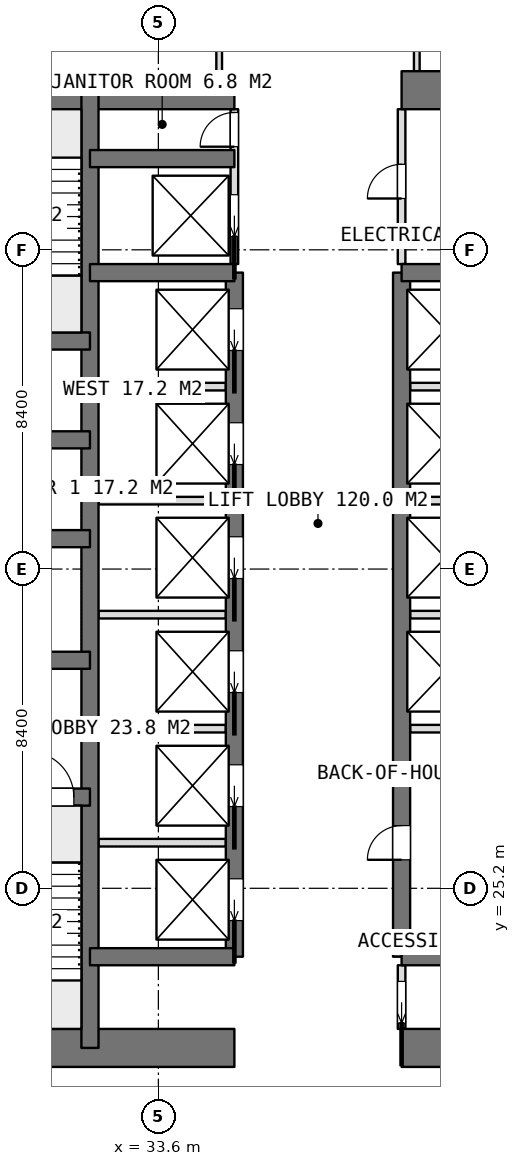
"""IFC4 building model, lengths in metres.
Left out: names, types, materials, properties, quantities, classifications, styles, units other than length and angle.
Written with IfcOpenShell. Run it as: python <this file> out.ifc"""

import sys

from ifc_helpers import new_model, si_unit, direction, frame, frame_2d, origin, place, context, subcontext, project, spatial, rectangle, extrude, element, fill, save


model = new_model("IFC4")
c1 = context("Model", 3, precision=1e-05, world=origin(), true_north=direction((0.0, 1.0)))
c2 = subcontext(c1, "Body", "Model", "MODEL_VIEW")
j1 = project(units=[si_unit("LENGTHUNIT", "METRE"), si_unit("PLANEANGLEUNIT", "RADIAN")], contexts=[c1])
p1 = place(None, origin())
s1 = spatial("IfcSite", under=j1, at=p1, CompositionType="ELEMENT")
p2 = place(p1, origin())
s2 = spatial("IfcBuilding", under=s1, at=p2, CompositionType="ELEMENT")
p3 = place(p2, frame((0.0, 0.0, 102.8)))
s3 = spatial("IfcBuildingStorey", under=s2, at=p3, CompositionType="ELEMENT", Elevation=102.8)
p4 = place(p3, frame((25.2, 21.0, 0.0), z_axis=(0.0, 0.0, 1.0), x_axis=(1.0, 0.0, 0.0)))
e1 = element("IfcWall", 1, at=p4, inside=s3, PredefinedType="SHEAR", context=c2, shape_type="SweptSolid", body=[
    extrude(rectangle(XDim=10.4, YDim=1.0, at=frame_2d((5.2, 0.0))), origin(), (0.0, 0.0, 1.0), 3.75),
])
p5 = place(p3, frame((40.0, 21.0, 0.0), z_axis=(0.0, 0.0, 1.0), x_axis=(1.0, 0.0, 0.0)))
e2 = element("IfcWall", 2, at=p5, inside=s3, PredefinedType="SHEAR", context=c2, shape_type="SweptSolid", body=[
    extrude(rectangle(XDim=10.4, YDim=1.0, at=frame_2d((5.2, 0.0))), origin(), (0.0, 0.0, 1.0), 3.75),
])
p6 = place(p3, frame((25.2, 46.2, 0.0), z_axis=(0.0, 0.0, 1.0), x_axis=(1.0, 0.0, 0.0)))
e3 = element("IfcWall", 3, at=p6, inside=s3, PredefinedType="SHEAR", context=c2, shape_type="SweptSolid", body=[
    extrude(rectangle(XDim=10.4, YDim=1.0, at=frame_2d((5.2, 0.0))), origin(), (0.0, 0.0, 1.0), 3.75),
])
p7 = place(p3, frame((40.0, 46.2, 0.0), z_axis=(0.0, 0.0, 1.0), x_axis=(1.0, 0.0, 0.0)))
e4 = element("IfcWall", 4, at=p7, inside=s3, PredefinedType="SHEAR", context=c2, shape_type="SweptSolid", body=[
    extrude(rectangle(XDim=10.4, YDim=1.0, at=frame_2d((5.2, 0.0))), origin(), (0.0, 0.0, 1.0), 3.75),
])
p8 = place(p3, frame((31.8, 21.0, 0.0), z_axis=(0.0, 0.0, 1.0), x_axis=(0.0, 1.0, 0.0)))
e5 = element("IfcWall", 5, at=p8, inside=s3, PredefinedType="SHEAR", context=c2, shape_type="SweptSolid", body=[
    extrude(rectangle(XDim=25.2, YDim=0.45, at=frame_2d((12.6, 0.0))), origin(), (0.0, 0.0, 1.0), 3.75),
])
p9 = place(p3, frame((35.6, 23.4, 0.0), z_axis=(0.0, 0.0, 1.0), x_axis=(0.0, 1.0, 0.0)))
e6 = element("IfcWall", 6, at=p9, inside=s3, PredefinedType="SHEAR", context=c2, shape_type="SweptSolid", body=[
    extrude(rectangle(XDim=18.0, YDim=0.45, at=frame_2d((9.0, 0.0))), origin(), (0.0, 0.0, 1.0), 3.75),
])
p10 = place(p9, frame((0.95, 0.0, 0.0)))
e7 = element("IfcOpeningElement", 7, at=p10, cuts=e6, PredefinedType="OPENING", context=c2, shape_type="SweptSolid", body=[
    extrude(rectangle(XDim=1.1, YDim=2.1, at=frame_2d((0.55, 1.05))), frame((0.0, 0.235, 0.0), z_axis=(0.0, -1.0, 0.0), x_axis=(1.0, 0.0, 0.0)), (0.0, 0.0, 1.0), 0.47),
])
p11 = place(p9, frame((3.95, 0.0, 0.0)))
e8 = element("IfcOpeningElement", 8, at=p11, cuts=e6, PredefinedType="OPENING", context=c2, shape_type="SweptSolid", body=[
    extrude(rectangle(XDim=1.1, YDim=2.1, at=frame_2d((0.55, 1.05))), frame((0.0, 0.235, 0.0), z_axis=(0.0, -1.0, 0.0), x_axis=(1.0, 0.0, 0.0)), (0.0, 0.0, 1.0), 0.47),
])
p12 = place(p9, frame((6.95, 0.0, 0.0)))
e9 = element("IfcOpeningElement", 9, at=p12, cuts=e6, PredefinedType="OPENING", context=c2, shape_type="SweptSolid", body=[
    extrude(rectangle(XDim=1.1, YDim=2.1, at=frame_2d((0.55, 1.05))), frame((0.0, 0.235, 0.0), z_axis=(0.0, -1.0, 0.0), x_axis=(1.0, 0.0, 0.0)), (0.0, 0.0, 1.0), 0.47),
])
p13 = place(p9, frame((9.95, 0.0, 0.0)))
e10 = element("IfcOpeningElement", 10, at=p13, cuts=e6, PredefinedType="OPENING", context=c2, shape_type="SweptSolid", body=[
    extrude(rectangle(XDim=1.1, YDim=2.1, at=frame_2d((0.55, 1.05))), frame((0.0, 0.235, 0.0), z_axis=(0.0, -1.0, 0.0), x_axis=(1.0, 0.0, 0.0)), (0.0, 0.0, 1.0), 0.47),
])
p14 = place(p9, frame((12.95, 0.0, 0.0)))
e11 = element("IfcOpeningElement", 11, at=p14, cuts=e6, PredefinedType="OPENING", context=c2, shape_type="SweptSolid", body=[
    extrude(rectangle(XDim=1.1, YDim=2.1, at=frame_2d((0.55, 1.05))), frame((0.0, 0.235, 0.0), z_axis=(0.0, -1.0, 0.0), x_axis=(1.0, 0.0, 0.0)), (0.0, 0.0, 1.0), 0.47),
])
p15 = place(p9, frame((15.95, 0.0, 0.0)))
e12 = element("IfcOpeningElement", 12, at=p15, cuts=e6, PredefinedType="OPENING", context=c2, shape_type="SweptSolid", body=[
    extrude(rectangle(XDim=1.1, YDim=2.1, at=frame_2d((0.55, 1.05))), frame((0.0, 0.235, 0.0), z_axis=(0.0, -1.0, 0.0), x_axis=(1.0, 0.0, 0.0)), (0.0, 0.0, 1.0), 0.47),
])
p16 = place(p3, frame((40.0, 23.4, 0.0), z_axis=(0.0, 0.0, 1.0), x_axis=(0.0, 1.0, 0.0)))
e13 = element("IfcWall", 13, at=p16, inside=s3, PredefinedType="SHEAR", context=c2, shape_type="SweptSolid", body=[
    extrude(rectangle(XDim=18.0, YDim=0.45, at=frame_2d((9.0, 0.0))), origin(), (0.0, 0.0, 1.0), 3.75),
])
p17 = place(p16, frame((2.55, 0.0, 0.0)))
e14 = element("IfcOpeningElement", 14, at=p17, cuts=e13, PredefinedType="OPENING", context=c2, shape_type="SweptSolid", body=[
    extrude(rectangle(XDim=0.9, YDim=2.1, at=frame_2d((0.45, 1.05))), frame((0.0, 0.235, 0.0), z_axis=(0.0, -1.0, 0.0), x_axis=(1.0, 0.0, 0.0)), (0.0, 0.0, 1.0), 0.47),
])
for number, where, z_axis, x_axis in (
    (15, (31.8, 23.4, 0.0), (0.0, 0.0, 1.0), (1.0, 0.0, 0.0)),
    (16, (31.8, 41.4, 0.0), (0.0, 0.0, 1.0), (1.0, 0.0, 0.0)),
    (17, (31.8, 44.4, 0.0), (0.0, 0.0, 1.0), (1.0, 0.0, 0.0)),
    (18, (40.0, 23.4, 0.0), (0.0, 0.0, 1.0), (1.0, 0.0, 0.0)),
    (19, (40.0, 41.4, 0.0), (0.0, 0.0, 1.0), (1.0, 0.0, 0.0)),
):
    element("IfcWall", number, at=place(p3, frame(where, z_axis=z_axis, x_axis=x_axis)), inside=s3, PredefinedType="SHEAR", context=c2, shape_type="SweptSolid", body=[
        extrude(rectangle(XDim=3.8, YDim=0.45, at=frame_2d((1.9, 0.0))), origin(), (0.0, 0.0, 1.0), 3.75),
    ])
p18 = place(p3, frame((25.2, 27.6, 0.0), z_axis=(0.0, 0.0, 1.0), x_axis=(1.0, 0.0, 0.0)))
e20 = element("IfcWall", 20, at=p18, inside=s3, PredefinedType="SHEAR", context=c2, shape_type="SweptSolid", body=[
    extrude(rectangle(XDim=6.6, YDim=0.45, at=frame_2d((3.3, 0.0))), origin(), (0.0, 0.0, 1.0), 3.75),
])
p19 = place(p18, frame((4.975, 0.0, 0.0)))
e21 = element("IfcOpeningElement", 21, at=p19, cuts=e20, PredefinedType="OPENING", context=c2, shape_type="SweptSolid", body=[
    extrude(rectangle(XDim=1.2, YDim=2.1, at=frame_2d((0.6, 1.05))), frame((0.0, 0.235, 0.0), z_axis=(0.0, -1.0, 0.0), x_axis=(1.0, 0.0, 0.0)), (0.0, 0.0, 1.0), 0.47),
])
p20 = place(p3, frame((25.2, 31.2, 0.0), z_axis=(0.0, 0.0, 1.0), x_axis=(1.0, 0.0, 0.0)))
e22 = element("IfcWall", 22, at=p20, inside=s3, PredefinedType="SHEAR", context=c2, shape_type="SweptSolid", body=[
    extrude(rectangle(XDim=6.6, YDim=0.45, at=frame_2d((3.3, 0.0))), origin(), (0.0, 0.0, 1.0), 3.75),
])
p21 = place(p20, frame((2.65, 0.0, 0.0)))
e23 = element("IfcOpeningElement", 23, at=p21, cuts=e22, PredefinedType="OPENING", context=c2, shape_type="SweptSolid", body=[
    extrude(rectangle(XDim=1.3, YDim=2.1, at=frame_2d((0.65, 1.05))), frame((0.0, 0.235, 0.0), z_axis=(0.0, -1.0, 0.0), x_axis=(1.0, 0.0, 0.0)), (0.0, 0.0, 1.0), 0.47),
])
for number, where, z_axis, x_axis in (
    (24, (25.2, 34.4, 0.0), (0.0, 0.0, 1.0), (1.0, 0.0, 0.0)),
    (25, (25.2, 37.0, 0.0), (0.0, 0.0, 1.0), (1.0, 0.0, 0.0)),
    (26, (25.2, 39.6, 0.0), (0.0, 0.0, 1.0), (1.0, 0.0, 0.0)),
):
    element("IfcWall", number, at=place(p3, frame(where, z_axis=z_axis, x_axis=x_axis)), inside=s3, PredefinedType="SHEAR", context=c2, shape_type="SweptSolid", body=[
        extrude(rectangle(XDim=6.6, YDim=0.45, at=frame_2d((3.3, 0.0))), origin(), (0.0, 0.0, 1.0), 3.75),
    ])
for number, where, z_axis, x_axis in (
    (27, (32.025, 26.4, 0.0), (0.0, 0.0, 1.0), (1.0, 0.0, 0.0)),
    (28, (32.025, 29.4, 0.0), (0.0, 0.0, 1.0), (1.0, 0.0, 0.0)),
    (29, (32.025, 32.4, 0.0), (0.0, 0.0, 1.0), (1.0, 0.0, 0.0)),
    (30, (32.025, 35.4, 0.0), (0.0, 0.0, 1.0), (1.0, 0.0, 0.0)),
    (31, (32.025, 38.4, 0.0), (0.0, 0.0, 1.0), (1.0, 0.0, 0.0)),
):
    element("IfcWall", number, at=place(p3, frame(where, z_axis=z_axis, x_axis=x_axis)), inside=s3, PredefinedType="PARTITIONING", context=c2, shape_type="SweptSolid", body=[
        extrude(rectangle(XDim=3.35, YDim=0.2, at=frame_2d((1.675, 0.0))), origin(), (0.0, 0.0, 1.0), 3.5),
    ])
for number, where, z_axis, x_axis in (
    (32, (40.225, 29.4, 0.0), (0.0, 0.0, 1.0), (1.0, 0.0, 0.0)),
    (33, (40.225, 32.4, 0.0), (0.0, 0.0, 1.0), (1.0, 0.0, 0.0)),
    (34, (40.225, 35.4, 0.0), (0.0, 0.0, 1.0), (1.0, 0.0, 0.0)),
    (35, (40.225, 38.4, 0.0), (0.0, 0.0, 1.0), (1.0, 0.0, 0.0)),
):
    element("IfcWall", number, at=place(p3, frame(where, z_axis=z_axis, x_axis=x_axis)), inside=s3, PredefinedType="PARTITIONING", context=c2, shape_type="SweptSolid", body=[
        extrude(rectangle(XDim=3.35, YDim=0.2, at=frame_2d((1.675, 0.0))), origin(), (0.0, 0.0, 1.0), 3.5),
    ])
p22 = place(p3, frame((40.0, 21.5, 0.0), z_axis=(0.0, 0.0, 1.0), x_axis=(0.0, 1.0, 0.0)))
e36 = element("IfcWall", 36, at=p22, inside=s3, PredefinedType="PARTITIONING", context=c2, shape_type="SweptSolid", body=[
    extrude(rectangle(XDim=1.675, YDim=0.2, at=frame_2d((0.837, 0.0))), origin(), (0.0, 0.0, 1.0), 3.5),
])
p23 = place(p22, frame((0.15, 0.0, 0.0)))
e37 = element("IfcOpeningElement", 37, at=p23, cuts=e36, PredefinedType="OPENING", context=c2, shape_type="SweptSolid", body=[
    extrude(rectangle(XDim=1.1, YDim=2.1, at=frame_2d((0.55, 1.05))), frame((0.0, 0.11, 0.0), z_axis=(0.0, -1.0, 0.0), x_axis=(1.0, 0.0, 0.0)), (0.0, 0.0, 1.0), 0.22),
])
p24 = place(p3, frame((40.0, 41.625, 0.0), z_axis=(0.0, 0.0, 1.0), x_axis=(0.0, 1.0, 0.0)))
e38 = element("IfcWall", 38, at=p24, inside=s3, PredefinedType="PARTITIONING", context=c2, shape_type="SweptSolid", body=[
    extrude(rectangle(XDim=4.075, YDim=0.2, at=frame_2d((2.038, 0.0))), origin(), (0.0, 0.0, 1.0), 3.5),
])
p25 = place(p24, frame((1.725, 0.0, 0.0)))
e39 = element("IfcOpeningElement", 39, at=p25, cuts=e38, PredefinedType="OPENING", context=c2, shape_type="SweptSolid", body=[
    extrude(rectangle(XDim=0.9, YDim=2.1, at=frame_2d((0.45, 1.05))), frame((0.0, 0.11, 0.0), z_axis=(0.0, -1.0, 0.0), x_axis=(1.0, 0.0, 0.0)), (0.0, 0.0, 1.0), 0.22),
])
p26 = place(p3, frame((35.6, 41.625, 0.0), z_axis=(0.0, 0.0, 1.0), x_axis=(0.0, 1.0, 0.0)))
e40 = element("IfcWall", 40, at=p26, inside=s3, PredefinedType="PARTITIONING", context=c2, shape_type="SweptSolid", body=[
    extrude(rectangle(XDim=4.075, YDim=0.2, at=frame_2d((2.038, 0.0))), origin(), (0.0, 0.0, 1.0), 3.5),
])
p27 = place(p26, frame((3.088, 0.0, 0.0)))
e41 = element("IfcOpeningElement", 41, at=p27, cuts=e40, PredefinedType="OPENING", context=c2, shape_type="SweptSolid", body=[
    extrude(rectangle(XDim=0.9, YDim=2.1, at=frame_2d((0.45, 1.05))), frame((0.0, 0.11, 0.0), z_axis=(0.0, -1.0, 0.0), x_axis=(1.0, 0.0, 0.0)), (0.0, 0.0, 1.0), 0.22),
])
p28 = place(p26, frame((0.725, 0.0, 0.0)))
e42 = element("IfcOpeningElement", 42, at=p28, cuts=e40, PredefinedType="OPENING", context=c2, shape_type="SweptSolid", body=[
    extrude(rectangle(XDim=1.1, YDim=2.1, at=frame_2d((0.55, 1.05))), frame((0.0, 0.11, 0.0), z_axis=(0.0, -1.0, 0.0), x_axis=(1.0, 0.0, 0.0)), (0.0, 0.0, 1.0), 0.22),
])
for number, where, z_axis, x_axis in (
    (43, (40.4, 46.7, 0.0), (0.0, 0.0, 1.0), (0.0, 1.0, 0.0)),
    (44, (35.2, 46.7, 0.0), (0.0, 0.0, 1.0), (0.0, 1.0, 0.0)),
):
    element("IfcWall", number, at=place(p3, frame(where, z_axis=z_axis, x_axis=x_axis)), inside=s3, PredefinedType="PARTITIONING", context=c2, shape_type="SweptSolid", body=[
        extrude(rectangle(XDim=2.625, YDim=0.15, at=frame_2d((1.312, 0.0))), origin(), (0.0, 0.0, 1.0), 3.5),
    ])
p29 = place(p23, origin())
e45 = element("IfcDoor", 45, at=p29, inside=s3, OperationType="SLIDING_TO_LEFT", PredefinedType="DOOR", context=c2, shape_type="SweptSolid", body=[
    extrude(rectangle(XDim=1.1, YDim=2.1, at=frame_2d((0.55, 1.05))), frame((0.0, 0.025, 0.0), z_axis=(0.0, -1.0, 0.0), x_axis=(1.0, 0.0, 0.0)), (0.0, 0.0, 1.0), 0.05),
])
fill(e37, e45)
p30 = place(p25, origin())
e46 = element("IfcDoor", 46, at=p30, inside=s3, OperationType="SINGLE_SWING_LEFT", PredefinedType="DOOR", context=c2, shape_type="SweptSolid", body=[
    extrude(rectangle(XDim=0.9, YDim=2.1, at=frame_2d((0.45, 1.05))), frame((0.0, 0.025, 0.0), z_axis=(0.0, -1.0, 0.0), x_axis=(1.0, 0.0, 0.0)), (0.0, 0.0, 1.0), 0.05),
])
fill(e39, e46)
p31 = place(p17, origin())
e47 = element("IfcDoor", 47, at=p31, inside=s3, OperationType="SINGLE_SWING_LEFT", PredefinedType="DOOR", context=c2, shape_type="SweptSolid", body=[
    extrude(rectangle(XDim=0.9, YDim=2.1, at=frame_2d((0.45, 1.05))), frame((0.0, 0.025, 0.0), z_axis=(0.0, -1.0, 0.0), x_axis=(1.0, 0.0, 0.0)), (0.0, 0.0, 1.0), 0.05),
])
fill(e14, e47)
p32 = place(p27, origin())
e48 = element("IfcDoor", 48, at=p32, inside=s3, OperationType="SINGLE_SWING_LEFT", PredefinedType="DOOR", context=c2, shape_type="SweptSolid", body=[
    extrude(rectangle(XDim=0.9, YDim=2.1, at=frame_2d((0.45, 1.05))), frame((0.0, 0.025, 0.0), z_axis=(0.0, -1.0, 0.0), x_axis=(1.0, 0.0, 0.0)), (0.0, 0.0, 1.0), 0.05),
])
fill(e41, e48)
p33 = place(p10, origin())
e49 = element("IfcDoor", 49, at=p33, inside=s3, OperationType="SLIDING_TO_LEFT", PredefinedType="USERDEFINED", context=c2, shape_type="SweptSolid", body=[
    extrude(rectangle(XDim=1.1, YDim=2.1, at=frame_2d((0.55, 1.05))), frame((0.0, 0.025, 0.0), z_axis=(0.0, -1.0, 0.0), x_axis=(1.0, 0.0, 0.0)), (0.0, 0.0, 1.0), 0.05),
])
fill(e7, e49)
p34 = place(p11, origin())
e50 = element("IfcDoor", 50, at=p34, inside=s3, OperationType="SLIDING_TO_LEFT", PredefinedType="USERDEFINED", context=c2, shape_type="SweptSolid", body=[
    extrude(rectangle(XDim=1.1, YDim=2.1, at=frame_2d((0.55, 1.05))), frame((0.0, 0.025, 0.0), z_axis=(0.0, -1.0, 0.0), x_axis=(1.0, 0.0, 0.0)), (0.0, 0.0, 1.0), 0.05),
])
fill(e8, e50)
p35 = place(p12, origin())
e51 = element("IfcDoor", 51, at=p35, inside=s3, OperationType="SLIDING_TO_LEFT", PredefinedType="USERDEFINED", context=c2, shape_type="SweptSolid", body=[
    extrude(rectangle(XDim=1.1, YDim=2.1, at=frame_2d((0.55, 1.05))), frame((0.0, 0.025, 0.0), z_axis=(0.0, -1.0, 0.0), x_axis=(1.0, 0.0, 0.0)), (0.0, 0.0, 1.0), 0.05),
])
fill(e9, e51)
p36 = place(p13, origin())
e52 = element("IfcDoor", 52, at=p36, inside=s3, OperationType="SLIDING_TO_LEFT", PredefinedType="USERDEFINED", context=c2, shape_type="SweptSolid", body=[
    extrude(rectangle(XDim=1.1, YDim=2.1, at=frame_2d((0.55, 1.05))), frame((0.0, 0.025, 0.0), z_axis=(0.0, -1.0, 0.0), x_axis=(1.0, 0.0, 0.0)), (0.0, 0.0, 1.0), 0.05),
])
fill(e10, e52)
p37 = place(p14, origin())
e53 = element("IfcDoor", 53, at=p37, inside=s3, OperationType="SLIDING_TO_LEFT", PredefinedType="USERDEFINED", context=c2, shape_type="SweptSolid", body=[
    extrude(rectangle(XDim=1.1, YDim=2.1, at=frame_2d((0.55, 1.05))), frame((0.0, 0.025, 0.0), z_axis=(0.0, -1.0, 0.0), x_axis=(1.0, 0.0, 0.0)), (0.0, 0.0, 1.0), 0.05),
])
fill(e11, e53)
p38 = place(p15, origin())
e54 = element("IfcDoor", 54, at=p38, inside=s3, OperationType="SLIDING_TO_LEFT", PredefinedType="USERDEFINED", context=c2, shape_type="SweptSolid", body=[
    extrude(rectangle(XDim=1.1, YDim=2.1, at=frame_2d((0.55, 1.05))), frame((0.0, 0.025, 0.0), z_axis=(0.0, -1.0, 0.0), x_axis=(1.0, 0.0, 0.0)), (0.0, 0.0, 1.0), 0.05),
])
fill(e12, e54)
p39 = place(p28, origin())
e55 = element("IfcDoor", 55, at=p39, inside=s3, OperationType="SLIDING_TO_LEFT", PredefinedType="USERDEFINED", context=c2, shape_type="SweptSolid", body=[
    extrude(rectangle(XDim=1.1, YDim=2.1, at=frame_2d((0.55, 1.05))), frame((0.0, 0.025, 0.0), z_axis=(0.0, -1.0, 0.0), x_axis=(1.0, 0.0, 0.0)), (0.0, 0.0, 1.0), 0.05),
])
fill(e42, e55)
p40 = place(p19, origin())
e56 = element("IfcDoor", 56, at=p40, inside=s3, OperationType="SINGLE_SWING_RIGHT", PredefinedType="DOOR", context=c2, shape_type="SweptSolid", body=[
    extrude(rectangle(XDim=1.2, YDim=2.1, at=frame_2d((0.6, 1.05))), frame((0.0, 0.025, 0.0), z_axis=(0.0, -1.0, 0.0), x_axis=(1.0, 0.0, 0.0)), (0.0, 0.0, 1.0), 0.05),
])
fill(e21, e56)
save(model, sys.argv[1])
